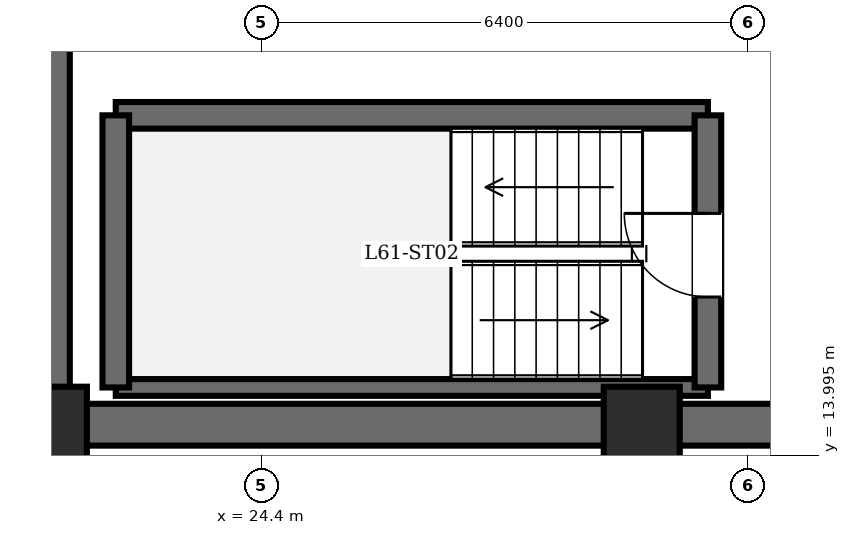
"""IFC4 building model, lengths in metres.
Left out: names, types, materials, properties, quantities, classifications, styles, units other than length and angle.
Written with IfcOpenShell. Run it as: python <this file> out.ifc"""

import sys

from ifc_helpers import new_model, si_unit, direction, frame, frame_2d, origin, origin_2d, place, context, subcontext, project, spatial, rectangle, extrude, element, fill, save


model = new_model("IFC4")
c1 = context("Model", 3, precision=1e-05, world=origin(), true_north=direction((0.0, 1.0)))
c2 = subcontext(c1, "Body", "Model", "MODEL_VIEW")
j1 = project(units=[si_unit("LENGTHUNIT", "METRE"), si_unit("PLANEANGLEUNIT", "RADIAN")], contexts=[c1])
p1 = place(None, origin())
s1 = spatial("IfcSite", under=j1, at=p1, CompositionType="ELEMENT")
p2 = place(p1, origin())
s2 = spatial("IfcBuilding", under=s1, at=p2, CompositionType="ELEMENT")
p3 = place(p2, frame((0.0, 0.0, 233.7)))
s3 = spatial("IfcBuildingStorey", under=s2, at=p3, CompositionType="ELEMENT", Elevation=233.7)
for number, where, z_axis, x_axis in (
    (1, (21.6, 14.4, 0.0), (0.0, 0.0, 1.0), (1.0, 0.0, 0.0)),
    (2, (29.4, 14.4, 0.0), (0.0, 0.0, 1.0), (1.0, 0.0, 0.0)),
):
    element("IfcColumn", number, at=place(p3, frame(where, z_axis=z_axis, x_axis=x_axis)), inside=s3, PredefinedType="COLUMN", context=c2, shape_type="SweptSolid", body=[
        extrude(rectangle(XDim=1.0, YDim=1.0, at=origin_2d()), origin(), (0.0, 0.0, 1.0), 3.6),
    ])
p4 = place(p3, frame((21.6, 14.4, 0.0), z_axis=(0.0, 0.0, 1.0), x_axis=(0.0, 1.0, 0.0)))
e3 = element("IfcWall", 3, at=p4, inside=s3, PredefinedType="SHEAR", context=c2, shape_type="SweptSolid", body=[
    extrude(rectangle(XDim=19.2, YDim=0.55, at=frame_2d((9.6, 0.0))), origin(), (0.0, 0.0, 1.0), 3.4),
])
p5 = place(p3, frame((37.2, 14.4, 0.0), z_axis=(0.0, 0.0, 1.0), x_axis=(-1.0, 0.0, 0.0)))
e4 = element("IfcWall", 4, at=p5, inside=s3, PredefinedType="SHEAR", context=c2, shape_type="SweptSolid", body=[
    extrude(rectangle(XDim=15.6, YDim=0.55, at=frame_2d((7.8, 0.0))), origin(), (0.0, 0.0, 1.0), 3.4),
])
p6 = place(p3, frame((22.48, 18.47, 0.0), z_axis=(0.0, 0.0, 1.0), x_axis=(1.0, 0.0, 0.0)))
e5 = element("IfcWall", 5, at=p6, inside=s3, PredefinedType="SOLIDWALL", context=c2, shape_type="SweptSolid", body=[
    extrude(rectangle(XDim=7.79, YDim=0.35, at=frame_2d((3.895, 0.0))), origin(), (0.0, 0.0, 1.0), 3.4),
])
p7 = place(p3, frame((22.48, 14.89, 0.0), z_axis=(0.0, 0.0, 1.0), x_axis=(1.0, 0.0, 0.0)))
e6 = element("IfcWall", 6, at=p7, inside=s3, PredefinedType="PARTITIONING", context=c2, shape_type="SweptSolid", body=[
    extrude(rectangle(XDim=7.79, YDim=0.22, at=frame_2d((3.895, 0.0))), origin(), (0.0, 0.0, 1.0), 3.4),
])
p8 = place(p3, frame((22.48, 14.89, 0.0), z_axis=(0.0, 0.0, 1.0), x_axis=(0.0, 1.0, 0.0)))
e7 = element("IfcWall", 7, at=p8, inside=s3, PredefinedType="SOLIDWALL", context=c2, shape_type="SweptSolid", body=[
    extrude(rectangle(XDim=3.58, YDim=0.35, at=frame_2d((1.79, 0.0))), origin(), (0.0, 0.0, 1.0), 3.4),
])
p9 = place(p3, frame((30.27, 14.89, 0.0), z_axis=(0.0, 0.0, 1.0), x_axis=(0.0, 1.0, 0.0)))
e8 = element("IfcWall", 8, at=p9, inside=s3, PredefinedType="SOLIDWALL", context=c2, shape_type="SweptSolid", body=[
    extrude(rectangle(XDim=3.58, YDim=0.35, at=frame_2d((1.79, 0.0))), origin(), (0.0, 0.0, 1.0), 3.4),
])
p10 = place(p9, frame((1.19, 0.0, 0.0)))
e9 = element("IfcOpeningElement", 9, at=p10, cuts=e8, PredefinedType="OPENING", context=c2, shape_type="SweptSolid", body=[
    extrude(rectangle(XDim=1.1, YDim=2.15, at=frame_2d((0.55, 1.075))), frame((0.0, 0.185, 0.0), z_axis=(0.0, -1.0, 0.0), x_axis=(1.0, 0.0, 0.0)), (0.0, 0.0, 1.0), 0.37),
])
p11 = place(p10, origin())
e10 = element("IfcDoor", 10, at=p11, inside=s3, OperationType="SINGLE_SWING_RIGHT", PredefinedType="DOOR", context=c2, shape_type="SweptSolid", body=[
    extrude(rectangle(XDim=1.1, YDim=2.15, at=frame_2d((0.55, 1.075))), frame((0.0, 0.025, 0.0), z_axis=(0.0, -1.0, 0.0), x_axis=(1.0, 0.0, 0.0)), (0.0, 0.0, 1.0), 0.05),
])
fill(e9, e10)
save(model, sys.argv[1])
